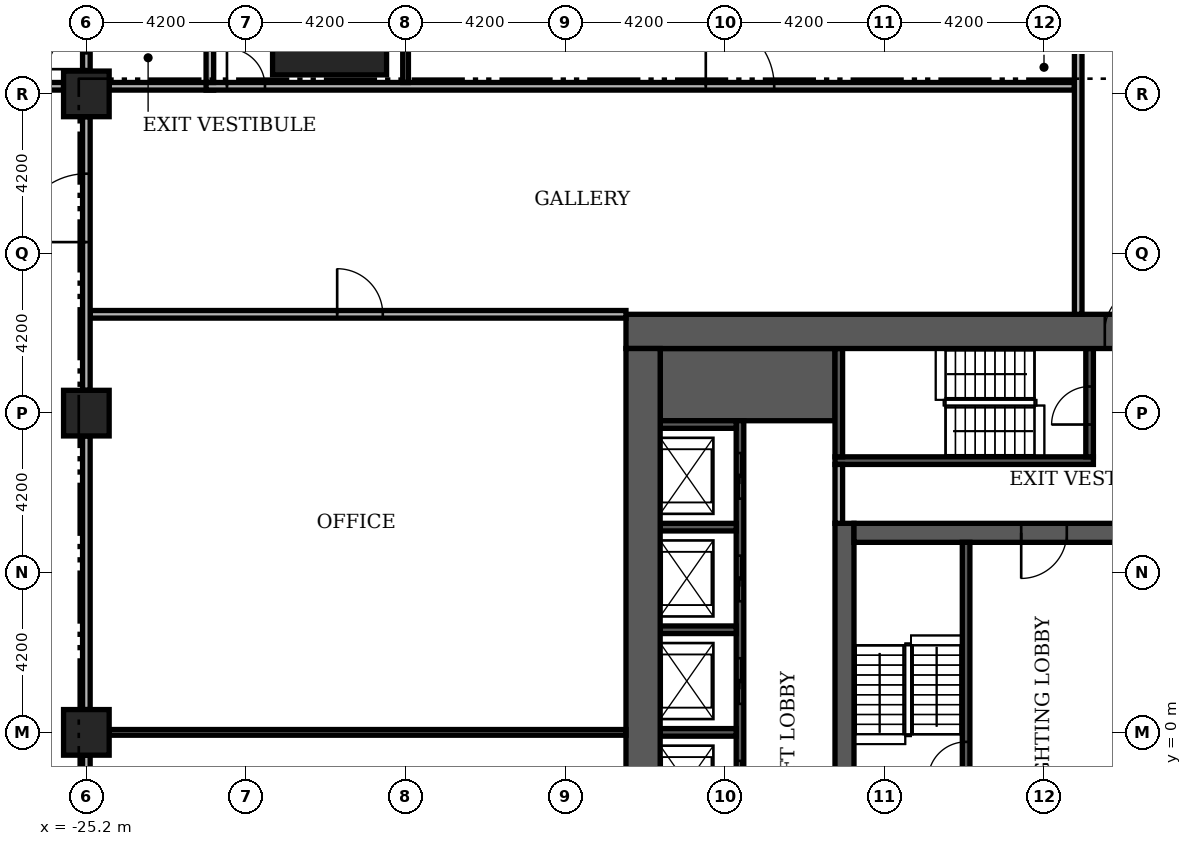
"""IFC4 building model, lengths in metres.
Left out: names, types, materials, properties, quantities, classifications, styles, units other than length and angle.
Written with IfcOpenShell. Run it as: python <this file> out.ifc"""

import sys

from ifc_helpers import new_model, si_unit, direction, frame, frame_2d, origin, origin_2d, place, context, subcontext, project, spatial, rectangle, extrude, element, fill, save


model = new_model("IFC4")
c1 = context("Model", 3, precision=1e-05, world=origin(), true_north=direction((0.0, 1.0)))
c2 = subcontext(c1, "Body", "Model", "MODEL_VIEW")
j1 = project(units=[si_unit("LENGTHUNIT", "METRE"), si_unit("PLANEANGLEUNIT", "RADIAN")], contexts=[c1])
p1 = place(None, origin())
s1 = spatial("IfcSite", under=j1, at=p1, CompositionType="ELEMENT")
p2 = place(p1, origin())
s2 = spatial("IfcBuilding", under=s1, at=p2, CompositionType="ELEMENT")
p3 = place(p2, origin())
s3 = spatial("IfcBuildingStorey", under=s2, at=p3, CompositionType="ELEMENT", Elevation=0.0)
p4 = place(p3, frame((-5.25, -5.0, 0.0), z_axis=(0.0, 0.0, 1.0), x_axis=(0.0, 1.0, 0.0)))
e1 = element("IfcWall", 1, at=p4, inside=s3, PredefinedType="SHEAR", context=c2, shape_type="SweptSolid", body=[
    extrude(rectangle(XDim=10.5, YDim=0.5, at=frame_2d((5.25, 0.0))), origin(), (0.0, 0.0, 1.0), 6.78),
])
p5 = place(p3, frame((-5.0, 5.25, 0.0), z_axis=(0.0, 0.0, 1.0), x_axis=(1.0, 0.0, 0.0)))
e2 = element("IfcWall", 2, at=p5, inside=s3, PredefinedType="SHEAR", context=c2, shape_type="SweptSolid", body=[
    extrude(rectangle(XDim=10.0, YDim=0.5, at=frame_2d((5.0, 0.0))), origin(), (0.0, 0.0, 1.0), 6.78),
])
p6 = place(p5, frame((4.4, 0.0, 0.0)))
e3 = element("IfcOpeningElement", 3, at=p6, cuts=e2, PredefinedType="OPENING", context=c2, shape_type="SweptSolid", body=[
    extrude(rectangle(XDim=1.2, YDim=2.1, at=frame_2d((0.6, 1.05))), frame((0.0, 0.26, 0.0), z_axis=(0.0, -1.0, 0.0), x_axis=(1.0, 0.0, 0.0)), (0.0, 0.0, 1.0), 0.52),
])
p7 = place(p3, frame((-10.1, 9.15, 0.0), z_axis=(0.0, 0.0, 1.0), x_axis=(1.0, 0.0, 0.0)))
e4 = element("IfcWall", 4, at=p7, inside=s3, PredefinedType="SHEAR", context=c2, shape_type="SweptSolid", body=[
    extrude(rectangle(XDim=4.6, YDim=1.9, at=frame_2d((2.3, 0.0))), origin(), (0.0, 0.0, 1.0), 6.78),
])
p8 = place(p3, frame((-2.05, -1.4, 0.0), z_axis=(0.0, 0.0, 1.0), x_axis=(0.0, 1.0, 0.0)))
e5 = element("IfcWall", 5, at=p8, inside=s3, PredefinedType="SHEAR", context=c2, shape_type="SweptSolid", body=[
    extrude(rectangle(XDim=6.4, YDim=0.2, at=frame_2d((3.2, 0.0))), origin(), (0.0, 0.0, 1.0), 6.78),
])
p9 = place(p8, frame((0.15, 0.0, 0.0)))
e6 = element("IfcOpeningElement", 6, at=p9, cuts=e5, PredefinedType="OPENING", context=c2, shape_type="SweptSolid", body=[
    extrude(rectangle(XDim=1.0, YDim=2.1, at=frame_2d((0.5, 1.05))), frame((0.0, 0.11, 0.0), z_axis=(0.0, -1.0, 0.0), x_axis=(1.0, 0.0, 0.0)), (0.0, 0.0, 1.0), 0.22),
])
p10 = place(p3, frame((-5.5, 7.15, 0.0), z_axis=(0.0, 0.0, 1.0), x_axis=(1.0, 0.0, 0.0)))
e7 = element("IfcWall", 7, at=p10, inside=s3, PredefinedType="SHEAR", context=c2, shape_type="SweptSolid", body=[
    extrude(rectangle(XDim=6.8, YDim=0.2, at=frame_2d((3.4, 0.0))), origin(), (0.0, 0.0, 1.0), 6.78),
])
p11 = place(p3, frame((-5.4, 7.25, 0.0), z_axis=(0.0, 0.0, 1.0), x_axis=(0.0, 1.0, 0.0)))
e8 = element("IfcWall", 8, at=p11, inside=s3, PredefinedType="SHEAR", context=c2, shape_type="SweptSolid", body=[
    extrude(rectangle(XDim=2.85, YDim=0.2, at=frame_2d((1.425, 0.0))), origin(), (0.0, 0.0, 1.0), 6.78),
])
p12 = place(p3, frame((1.2, 7.25, 0.0), z_axis=(0.0, 0.0, 1.0), x_axis=(0.0, 1.0, 0.0)))
e9 = element("IfcWall", 9, at=p12, inside=s3, PredefinedType="SHEAR", context=c2, shape_type="SweptSolid", body=[
    extrude(rectangle(XDim=2.85, YDim=0.2, at=frame_2d((1.425, 0.0))), origin(), (0.0, 0.0, 1.0), 6.78),
])
p13 = place(p12, frame((0.85, 0.0, 0.0)))
e10 = element("IfcOpeningElement", 10, at=p13, cuts=e9, PredefinedType="OPENING", context=c2, shape_type="SweptSolid", body=[
    extrude(rectangle(XDim=1.0, YDim=2.1, at=frame_2d((0.5, 1.05))), frame((0.0, 0.11, 0.0), z_axis=(0.0, -1.0, 0.0), x_axis=(1.0, 0.0, 0.0)), (0.0, 0.0, 1.0), 0.22),
])
p14 = place(p3, frame((-8.0, -8.0, 0.0), z_axis=(0.0, 0.0, 1.0), x_axis=(0.0, 1.0, 0.0)))
e11 = element("IfcWall", 11, at=p14, inside=s3, PredefinedType="SHEAR", context=c2, shape_type="SweptSolid", body=[
    extrude(rectangle(XDim=16.2, YDim=0.2, at=frame_2d((8.1, 0.0))), origin(), (0.0, 0.0, 1.0), 6.78),
])
p15 = place(p14, frame((0.65, 0.0, 0.0)))
e12 = element("IfcOpeningElement", 12, at=p15, cuts=e11, PredefinedType="OPENING", context=c2, shape_type="SweptSolid", body=[
    extrude(rectangle(XDim=1.2, YDim=2.1, at=frame_2d((0.6, 1.05))), frame((0.0, 0.11, 0.0), z_axis=(0.0, -1.0, 0.0), x_axis=(1.0, 0.0, 0.0)), (0.0, 0.0, 1.0), 0.22),
])
p16 = place(p14, frame((3.35, 0.0, 0.0)))
e13 = element("IfcOpeningElement", 13, at=p16, cuts=e11, PredefinedType="OPENING", context=c2, shape_type="SweptSolid", body=[
    extrude(rectangle(XDim=1.2, YDim=2.1, at=frame_2d((0.6, 1.05))), frame((0.0, 0.11, 0.0), z_axis=(0.0, -1.0, 0.0), x_axis=(1.0, 0.0, 0.0)), (0.0, 0.0, 1.0), 0.22),
])
p17 = place(p14, frame((6.05, 0.0, 0.0)))
e14 = element("IfcOpeningElement", 14, at=p17, cuts=e11, PredefinedType="OPENING", context=c2, shape_type="SweptSolid", body=[
    extrude(rectangle(XDim=1.2, YDim=2.1, at=frame_2d((0.6, 1.05))), frame((0.0, 0.11, 0.0), z_axis=(0.0, -1.0, 0.0), x_axis=(1.0, 0.0, 0.0)), (0.0, 0.0, 1.0), 0.22),
])
p18 = place(p14, frame((8.75, 0.0, 0.0)))
e15 = element("IfcOpeningElement", 15, at=p18, cuts=e11, PredefinedType="OPENING", context=c2, shape_type="SweptSolid", body=[
    extrude(rectangle(XDim=1.2, YDim=2.1, at=frame_2d((0.6, 1.05))), frame((0.0, 0.11, 0.0), z_axis=(0.0, -1.0, 0.0), x_axis=(1.0, 0.0, 0.0)), (0.0, 0.0, 1.0), 0.22),
])
p19 = place(p14, frame((11.45, 0.0, 0.0)))
e16 = element("IfcOpeningElement", 16, at=p19, cuts=e11, PredefinedType="OPENING", context=c2, shape_type="SweptSolid", body=[
    extrude(rectangle(XDim=1.2, YDim=2.1, at=frame_2d((0.6, 1.05))), frame((0.0, 0.11, 0.0), z_axis=(0.0, -1.0, 0.0), x_axis=(1.0, 0.0, 0.0)), (0.0, 0.0, 1.0), 0.22),
])
p20 = place(p14, frame((14.15, 0.0, 0.0)))
e17 = element("IfcOpeningElement", 17, at=p20, cuts=e11, PredefinedType="OPENING", context=c2, shape_type="SweptSolid", body=[
    extrude(rectangle(XDim=1.2, YDim=2.1, at=frame_2d((0.6, 1.05))), frame((0.0, 0.11, 0.0), z_axis=(0.0, -1.0, 0.0), x_axis=(1.0, 0.0, 0.0)), (0.0, 0.0, 1.0), 0.22),
])
for number, where, z_axis, x_axis in (
    (18, (-10.1, 0.0, 0.0), (0.0, 0.0, 1.0), (1.0, 0.0, 0.0)),
    (19, (-10.1, 2.7, 0.0), (0.0, 0.0, 1.0), (1.0, 0.0, 0.0)),
    (20, (-10.1, 5.4, 0.0), (0.0, 0.0, 1.0), (1.0, 0.0, 0.0)),
    (21, (-10.1, 8.1, 0.0), (0.0, 0.0, 1.0), (1.0, 0.0, 0.0)),
):
    element("IfcWall", number, at=place(p3, frame(where, z_axis=z_axis, x_axis=x_axis)), inside=s3, PredefinedType="SHEAR", context=c2, shape_type="SweptSolid", body=[
        extrude(rectangle(XDim=2.0, YDim=0.2, at=frame_2d((1.0, 0.0))), origin(), (0.0, 0.0, 1.0), 6.78),
    ])
p21 = place(p3, frame((-11.0, 10.55, 0.0), z_axis=(0.0, 0.0, 1.0), x_axis=(1.0, 0.0, 0.0)))
e22 = element("IfcWall", 22, at=p21, inside=s3, PredefinedType="SHEAR", context=c2, shape_type="SweptSolid", body=[
    extrude(rectangle(XDim=22.0, YDim=0.9, at=frame_2d((11.0, 0.0))), origin(), (0.0, 0.0, 1.0), 6.78),
])
p22 = place(p21, frame((12.6, 0.0, 0.0)))
e23 = element("IfcOpeningElement", 23, at=p22, cuts=e22, PredefinedType="OPENING", context=c2, shape_type="SweptSolid", body=[
    extrude(rectangle(XDim=1.2, YDim=2.2, at=frame_2d((0.6, 1.1))), frame((0.0, 0.46, 0.0), z_axis=(0.0, -1.0, 0.0), x_axis=(1.0, 0.0, 0.0)), (0.0, 0.0, 1.0), 0.92),
])
p23 = place(p21, frame((14.8, 0.0, 0.0)))
e24 = element("IfcOpeningElement", 24, at=p23, cuts=e22, PredefinedType="OPENING", context=c2, shape_type="SweptSolid", body=[
    extrude(rectangle(XDim=1.2, YDim=2.2, at=frame_2d((0.6, 1.1))), frame((0.0, 0.46, 0.0), z_axis=(0.0, -1.0, 0.0), x_axis=(1.0, 0.0, 0.0)), (0.0, 0.0, 1.0), 0.92),
])
p24 = place(p3, frame((-10.55, -10.1, 0.0), z_axis=(0.0, 0.0, 1.0), x_axis=(0.0, 1.0, 0.0)))
e25 = element("IfcWall", 25, at=p24, inside=s3, PredefinedType="SHEAR", context=c2, shape_type="SweptSolid", body=[
    extrude(rectangle(XDim=20.2, YDim=0.9, at=frame_2d((10.1, 0.0))), origin(), (0.0, 0.0, 1.0), 6.78),
])
p25 = place(p3, frame((-18.8, 18.8, 0.0), z_axis=(0.0, 0.0, 1.0), x_axis=(1.0, 0.0, 0.0)))
e26 = element("IfcColumn", 26, at=p25, inside=s3, PredefinedType="COLUMN", context=c2, shape_type="SweptSolid", body=[
    extrude(rectangle(XDim=3.0, YDim=3.0, at=origin_2d()), origin(), (0.0, 0.0, 1.0), 7.2),
])
for number, where, z_axis, x_axis in (
    (27, (-25.2, 0.0, 0.0), (0.0, 0.0, 1.0), (1.0, 0.0, 0.0)),
    (28, (-25.2, 8.4, 0.0), (0.0, 0.0, 1.0), (1.0, 0.0, 0.0)),
    (29, (-25.2, 16.8, 0.0), (0.0, 0.0, 1.0), (1.0, 0.0, 0.0)),
):
    element("IfcColumn", number, at=place(p3, frame(where, z_axis=z_axis, x_axis=x_axis)), inside=s3, PredefinedType="COLUMN", context=c2, shape_type="SweptSolid", body=[
        extrude(rectangle(XDim=1.2, YDim=1.2, at=origin_2d()), origin(), (0.0, 0.0, 1.0), 7.2),
    ])
p26 = place(p3, frame((-5.4, 5.5, 0.0), z_axis=(0.0, 0.0, 1.0), x_axis=(0.0, 1.0, 0.0)))
e30 = element("IfcWall", 30, at=p26, inside=s3, PredefinedType="PARTITIONING", context=c2, shape_type="SweptSolid", body=[
    extrude(rectangle(XDim=1.55, YDim=0.2, at=frame_2d((0.775, 0.0))), origin(), (0.0, 0.0, 1.0), 6.78),
])
p27 = place(p3, frame((-24.6, 0.0, 0.0), z_axis=(0.0, 0.0, 1.0), x_axis=(1.0, 0.0, 0.0)))
e31 = element("IfcWall", 31, at=p27, inside=s3, PredefinedType="PARTITIONING", context=c2, shape_type="SweptSolid", body=[
    extrude(rectangle(XDim=13.6, YDim=0.15, at=frame_2d((6.8, 0.0))), origin(), (0.0, 0.0, 1.0), 6.78),
])
p28 = place(p3, frame((-25.1, 11.0, 0.0), z_axis=(0.0, 0.0, 1.0), x_axis=(1.0, 0.0, 0.0)))
e32 = element("IfcWall", 32, at=p28, inside=s3, PredefinedType="PARTITIONING", context=c2, shape_type="SweptSolid", body=[
    extrude(rectangle(XDim=14.1, YDim=0.2, at=frame_2d((7.05, 0.0))), origin(), (0.0, 0.0, 1.0), 6.78),
])
p29 = place(p28, frame((6.5, 0.0, 0.0)))
e33 = element("IfcOpeningElement", 33, at=p29, cuts=e32, PredefinedType="OPENING", context=c2, shape_type="SweptSolid", body=[
    extrude(rectangle(XDim=1.2, YDim=2.2, at=frame_2d((0.6, 1.1))), frame((0.0, 0.11, 0.0), z_axis=(0.0, -1.0, 0.0), x_axis=(1.0, 0.0, 0.0)), (0.0, 0.0, 1.0), 0.22),
])
p30 = place(p3, frame((-33.0, 17.0, 0.0), z_axis=(0.0, 0.0, 1.0), x_axis=(1.0, 0.0, 0.0)))
e34 = element("IfcWall", 34, at=p30, inside=s3, PredefinedType="PARTITIONING", context=c2, shape_type="SweptSolid", body=[
    extrude(rectangle(XDim=7.2, YDim=0.2, at=frame_2d((3.6, 0.0))), origin(), (0.0, 0.0, 1.0), 6.48),
])
p31 = place(p3, frame((-24.6, 17.0, 0.0), z_axis=(0.0, 0.0, 1.0), x_axis=(1.0, 0.0, 0.0)))
e35 = element("IfcWall", 35, at=p31, inside=s3, PredefinedType="PARTITIONING", context=c2, shape_type="SweptSolid", body=[
    extrude(rectangle(XDim=2.75, YDim=0.2, at=frame_2d((1.375, 0.0))), origin(), (0.0, 0.0, 1.0), 6.78),
])
p32 = place(p3, frame((-22.05, 17.0, 0.0), z_axis=(0.0, 0.0, 1.0), x_axis=(1.0, 0.0, 0.0)))
e36 = element("IfcWall", 36, at=p32, inside=s3, PredefinedType="PARTITIONING", context=c2, shape_type="SweptSolid", body=[
    extrude(rectangle(XDim=22.85, YDim=0.2, at=frame_2d((11.425, 0.0))), origin(), (0.0, 0.0, 1.0), 6.78),
])
p33 = place(p32, frame((0.55, 0.0, 0.0)))
e37 = element("IfcOpeningElement", 37, at=p33, cuts=e36, PredefinedType="OPENING", context=c2, shape_type="SweptSolid", body=[
    extrude(rectangle(XDim=1.0, YDim=2.1, at=frame_2d((0.5, 1.05))), frame((0.0, 0.11, 0.0), z_axis=(0.0, -1.0, 0.0), x_axis=(1.0, 0.0, 0.0)), (0.0, 0.0, 1.0), 0.22),
])
p34 = place(p32, frame((13.15, 0.0, 0.0)))
e38 = element("IfcOpeningElement", 38, at=p34, cuts=e36, PredefinedType="OPENING", context=c2, shape_type="SweptSolid", body=[
    extrude(rectangle(XDim=1.8, YDim=2.2, at=frame_2d((0.9, 1.1))), frame((0.0, 0.11, 0.0), z_axis=(0.0, -1.0, 0.0), x_axis=(1.0, 0.0, 0.0)), (0.0, 0.0, 1.0), 0.22),
])
for number, where, z_axis, x_axis in (
    (39, (-25.2, -7.8, 0.0), (0.0, 0.0, 1.0), (0.0, 1.0, 0.0)),
    (40, (-25.2, 0.6, 0.0), (0.0, 0.0, 1.0), (0.0, 1.0, 0.0)),
):
    element("IfcWall", number, at=place(p3, frame(where, z_axis=z_axis, x_axis=x_axis)), inside=s3, PredefinedType="PARTITIONING", context=c2, shape_type="SweptSolid", body=[
        extrude(rectangle(XDim=7.2, YDim=0.2, at=frame_2d((3.6, 0.0))), origin(), (0.0, 0.0, 1.0), 6.48),
    ])
p35 = place(p3, frame((-25.2, 9.0, 0.0), z_axis=(0.0, 0.0, 1.0), x_axis=(0.0, 1.0, 0.0)))
e41 = element("IfcWall", 41, at=p35, inside=s3, PredefinedType="PARTITIONING", context=c2, shape_type="SweptSolid", body=[
    extrude(rectangle(XDim=7.2, YDim=0.2, at=frame_2d((3.6, 0.0))), origin(), (0.0, 0.0, 1.0), 6.48),
])
p36 = place(p35, frame((3.9, 0.0, 0.0)))
e42 = element("IfcOpeningElement", 42, at=p36, cuts=e41, PredefinedType="OPENING", context=c2, shape_type="SweptSolid", body=[
    extrude(rectangle(XDim=1.8, YDim=2.2, at=frame_2d((0.9, 1.1))), frame((0.0, 0.11, 0.0), z_axis=(0.0, -1.0, 0.0), x_axis=(1.0, 0.0, 0.0)), (0.0, 0.0, 1.0), 0.22),
])
p37 = place(p3, frame((-25.2, 17.4, 0.0), z_axis=(0.0, 0.0, 1.0), x_axis=(0.0, 1.0, 0.0)))
e43 = element("IfcWall", 43, at=p37, inside=s3, PredefinedType="PARTITIONING", context=c2, shape_type="SweptSolid", body=[
    extrude(rectangle(XDim=1.1, YDim=0.2, at=frame_2d((0.55, 0.0))), origin(), (0.0, 0.0, 1.0), 6.38),
])
p38 = place(p37, frame((0.05, 0.0, 0.0)))
e44 = element("IfcOpeningElement", 44, at=p38, cuts=e43, PredefinedType="OPENING", context=c2, shape_type="SweptSolid", body=[
    extrude(rectangle(XDim=1.0, YDim=2.2, at=frame_2d((0.5, 1.1))), frame((0.0, 0.11, 0.0), z_axis=(0.0, -1.0, 0.0), x_axis=(1.0, 0.0, 0.0)), (0.0, 0.0, 1.0), 0.22),
])
p39 = place(p3, frame((-21.95, 17.1, 0.0), z_axis=(0.0, 0.0, 1.0), x_axis=(0.0, 1.0, 0.0)))
e45 = element("IfcWall", 45, at=p39, inside=s3, PredefinedType="PARTITIONING", context=c2, shape_type="SweptSolid", body=[
    extrude(rectangle(XDim=1.4, YDim=0.2, at=frame_2d((0.7, 0.0))), origin(), (0.0, 0.0, 1.0), 6.78),
])
p40 = place(p3, frame((-16.8, 17.1, 0.0), z_axis=(0.0, 0.0, 1.0), x_axis=(0.0, 1.0, 0.0)))
e46 = element("IfcWall", 46, at=p40, inside=s3, PredefinedType="PARTITIONING", context=c2, shape_type="SweptSolid", body=[
    extrude(rectangle(XDim=7.5, YDim=0.15, at=frame_2d((3.75, 0.0))), origin(), (0.0, 0.0, 1.0), 6.78),
])
p41 = place(p3, frame((0.9, 11.0, 0.0), z_axis=(0.0, 0.0, 1.0), x_axis=(0.0, 1.0, 0.0)))
e47 = element("IfcWall", 47, at=p41, inside=s3, PredefinedType="PARTITIONING", context=c2, shape_type="SweptSolid", body=[
    extrude(rectangle(XDim=35.55, YDim=0.2, at=frame_2d((17.775, 0.0))), origin(), (0.0, 0.0, 1.0), 6.48),
])
p42 = place(p17, origin())
e48 = element("IfcDoor", 48, at=p42, inside=s3, OperationType="SLIDING_TO_LEFT", PredefinedType="DOOR", context=c2, shape_type="SweptSolid", body=[
    extrude(rectangle(XDim=1.2, YDim=2.1, at=frame_2d((0.6, 1.05))), frame((0.0, 0.025, 0.0), z_axis=(0.0, -1.0, 0.0), x_axis=(1.0, 0.0, 0.0)), (0.0, 0.0, 1.0), 0.05),
])
fill(e14, e48)
p43 = place(p18, origin())
e49 = element("IfcDoor", 49, at=p43, inside=s3, OperationType="SLIDING_TO_LEFT", PredefinedType="DOOR", context=c2, shape_type="SweptSolid", body=[
    extrude(rectangle(XDim=1.2, YDim=2.1, at=frame_2d((0.6, 1.05))), frame((0.0, 0.025, 0.0), z_axis=(0.0, -1.0, 0.0), x_axis=(1.0, 0.0, 0.0)), (0.0, 0.0, 1.0), 0.05),
])
fill(e15, e49)
p44 = place(p19, origin())
e50 = element("IfcDoor", 50, at=p44, inside=s3, OperationType="SLIDING_TO_LEFT", PredefinedType="DOOR", context=c2, shape_type="SweptSolid", body=[
    extrude(rectangle(XDim=1.2, YDim=2.1, at=frame_2d((0.6, 1.05))), frame((0.0, 0.025, 0.0), z_axis=(0.0, -1.0, 0.0), x_axis=(1.0, 0.0, 0.0)), (0.0, 0.0, 1.0), 0.05),
])
fill(e16, e50)
p45 = place(p20, origin())
e51 = element("IfcDoor", 51, at=p45, inside=s3, OperationType="SLIDING_TO_LEFT", PredefinedType="DOOR", context=c2, shape_type="SweptSolid", body=[
    extrude(rectangle(XDim=1.2, YDim=2.1, at=frame_2d((0.6, 1.05))), frame((0.0, 0.025, 0.0), z_axis=(0.0, -1.0, 0.0), x_axis=(1.0, 0.0, 0.0)), (0.0, 0.0, 1.0), 0.05),
])
fill(e17, e51)
p46 = place(p9, origin())
e52 = element("IfcDoor", 52, at=p46, inside=s3, OperationType="SINGLE_SWING_LEFT", PredefinedType="DOOR", context=c2, shape_type="SweptSolid", body=[
    extrude(rectangle(XDim=1.0, YDim=2.1, at=frame_2d((0.5, 1.05))), frame((0.0, 0.025, 0.0), z_axis=(0.0, -1.0, 0.0), x_axis=(1.0, 0.0, 0.0)), (0.0, 0.0, 1.0), 0.05),
])
fill(e6, e52)
p47 = place(p6, frame((1.2, 0.0, 0.0), z_axis=(0.0, 0.0, 1.0), x_axis=(-1.0, 0.0, 0.0)))
e53 = element("IfcDoor", 53, at=p47, inside=s3, OperationType="SINGLE_SWING_LEFT", PredefinedType="DOOR", context=c2, shape_type="SweptSolid", body=[
    extrude(rectangle(XDim=1.2, YDim=2.1, at=frame_2d((0.6, 1.05))), frame((0.0, 0.025, 0.0), z_axis=(0.0, -1.0, 0.0), x_axis=(1.0, 0.0, 0.0)), (0.0, 0.0, 1.0), 0.05),
])
fill(e3, e53)
p48 = place(p13, origin())
e54 = element("IfcDoor", 54, at=p48, inside=s3, OperationType="SINGLE_SWING_LEFT", PredefinedType="DOOR", context=c2, shape_type="SweptSolid", body=[
    extrude(rectangle(XDim=1.0, YDim=2.1, at=frame_2d((0.5, 1.05))), frame((0.0, 0.025, 0.0), z_axis=(0.0, -1.0, 0.0), x_axis=(1.0, 0.0, 0.0)), (0.0, 0.0, 1.0), 0.05),
])
fill(e10, e54)
p49 = place(p22, origin())
e55 = element("IfcDoor", 55, at=p49, inside=s3, OperationType="SINGLE_SWING_RIGHT", PredefinedType="DOOR", context=c2, shape_type="SweptSolid", body=[
    extrude(rectangle(XDim=1.2, YDim=2.2, at=frame_2d((0.6, 1.1))), frame((0.0, 0.025, 0.0), z_axis=(0.0, -1.0, 0.0), x_axis=(1.0, 0.0, 0.0)), (0.0, 0.0, 1.0), 0.05),
])
fill(e23, e55)
p50 = place(p29, origin())
e56 = element("IfcDoor", 56, at=p50, inside=s3, OperationType="SINGLE_SWING_LEFT", PredefinedType="DOOR", context=c2, shape_type="SweptSolid", body=[
    extrude(rectangle(XDim=1.2, YDim=2.2, at=frame_2d((0.6, 1.1))), frame((0.0, 0.025, 0.0), z_axis=(0.0, -1.0, 0.0), x_axis=(1.0, 0.0, 0.0)), (0.0, 0.0, 1.0), 0.05),
])
fill(e33, e56)
p51 = place(p36, origin())
e57 = element("IfcDoor", 57, at=p51, inside=s3, OperationType="DOUBLE_DOOR_SINGLE_SWING", PredefinedType="DOOR", context=c2, shape_type="SweptSolid", body=[
    extrude(rectangle(XDim=1.8, YDim=2.2, at=frame_2d((0.9, 1.1))), frame((0.0, 0.025, 0.0), z_axis=(0.0, -1.0, 0.0), x_axis=(1.0, 0.0, 0.0)), (0.0, 0.0, 1.0), 0.05),
])
fill(e42, e57)
p52 = place(p33, origin())
e58 = element("IfcDoor", 58, at=p52, inside=s3, OperationType="SINGLE_SWING_LEFT", PredefinedType="DOOR", context=c2, shape_type="SweptSolid", body=[
    extrude(rectangle(XDim=1.0, YDim=2.1, at=frame_2d((0.5, 1.05))), frame((0.0, 0.025, 0.0), z_axis=(0.0, -1.0, 0.0), x_axis=(1.0, 0.0, 0.0)), (0.0, 0.0, 1.0), 0.05),
])
fill(e37, e58)
p53 = place(p34, origin())
e59 = element("IfcDoor", 59, at=p53, inside=s3, OperationType="DOUBLE_DOOR_SINGLE_SWING", PredefinedType="DOOR", context=c2, shape_type="SweptSolid", body=[
    extrude(rectangle(XDim=1.8, YDim=2.2, at=frame_2d((0.9, 1.1))), frame((0.0, 0.025, 0.0), z_axis=(0.0, -1.0, 0.0), x_axis=(1.0, 0.0, 0.0)), (0.0, 0.0, 1.0), 0.05),
])
fill(e38, e59)
p54 = place(p38, origin())
e60 = element("IfcDoor", 60, at=p54, inside=s3, OperationType="SINGLE_SWING_LEFT", PredefinedType="DOOR", context=c2, shape_type="SweptSolid", body=[
    extrude(rectangle(XDim=1.0, YDim=2.2, at=frame_2d((0.5, 1.1))), frame((0.0, 0.025, 0.0), z_axis=(0.0, -1.0, 0.0), x_axis=(1.0, 0.0, 0.0)), (0.0, 0.0, 1.0), 0.05),
])
fill(e44, e60)
save(model, sys.argv[1])
